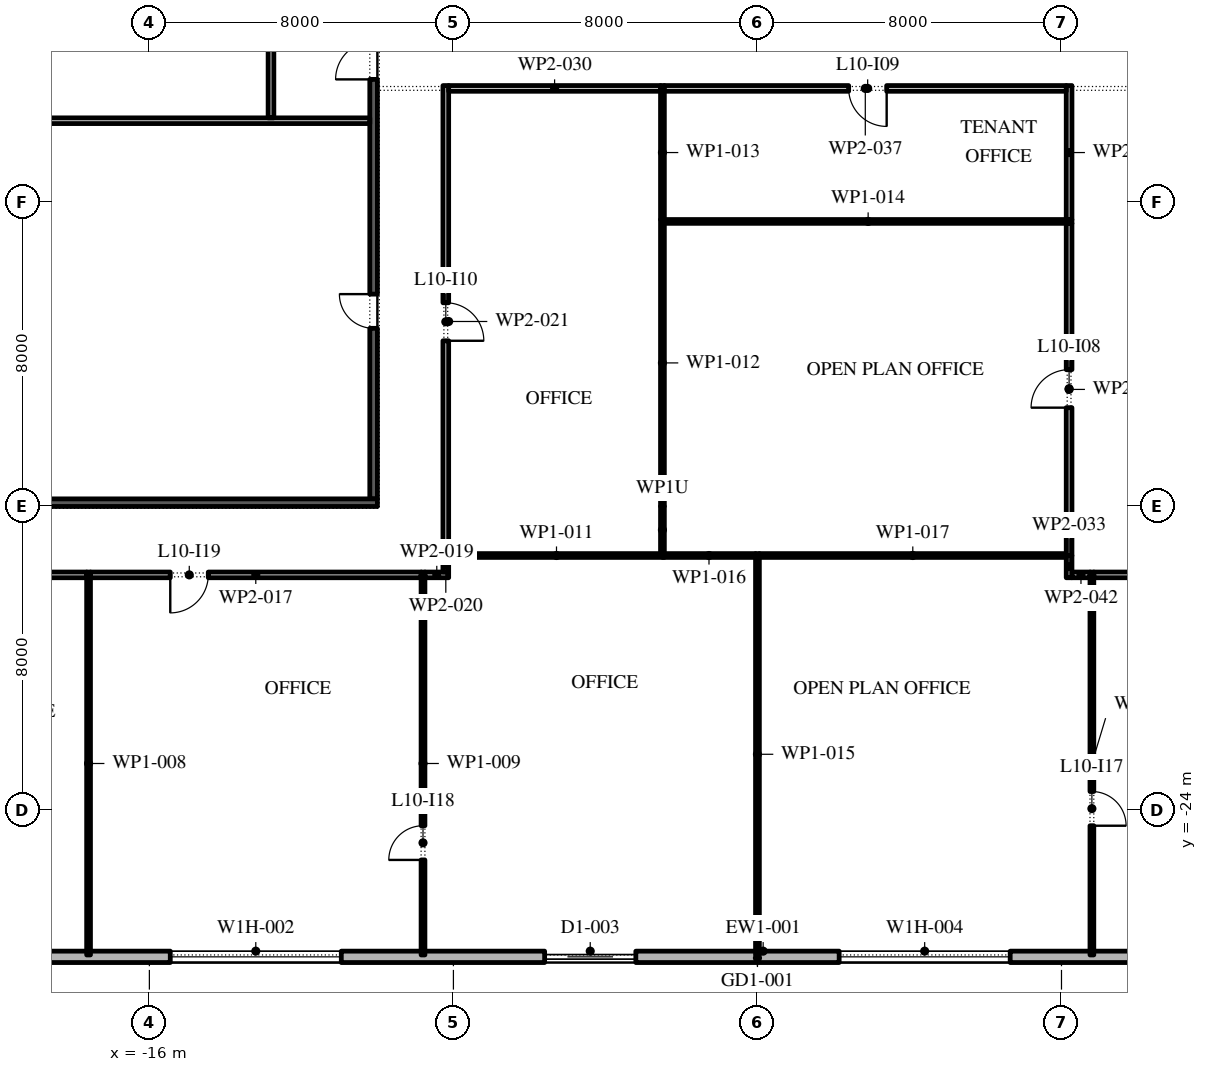
"""IFC4 building model, lengths in metres.
Left out: names, types, materials, properties, quantities, classifications, styles, units other than length and angle.
Written with IfcOpenShell. Run it as: python <this file> out.ifc"""

import sys

from ifc_helpers import new_model, si_unit, direction, frame, frame_2d, origin, place, context, subcontext, project, spatial, rectangle, extrude, element, fill, save


model = new_model("IFC4")
c1 = context("Model", 3, precision=1e-05, world=origin(), true_north=direction((0.0, 1.0)))
c2 = subcontext(c1, "Body", "Model", "MODEL_VIEW")
j1 = project(units=[si_unit("LENGTHUNIT", "METRE"), si_unit("PLANEANGLEUNIT", "RADIAN")], contexts=[c1])
p1 = place(None, origin())
s1 = spatial("IfcSite", under=j1, at=p1, CompositionType="ELEMENT")
p2 = place(p1, origin())
s2 = spatial("IfcBuilding", under=s1, at=p2, CompositionType="ELEMENT")
p3 = place(p2, frame((0.0, 0.0, 52.2)))
s3 = spatial("IfcBuildingStorey", under=s2, at=p3, CompositionType="ELEMENT", Elevation=52.2)
p4 = place(p3, frame((-26.1, -27.85, 0.0), z_axis=(0.0, 0.0, 1.0), x_axis=(1.0, 0.0, 0.0)))
e1 = element("IfcWall", 1, at=p4, inside=s3, PredefinedType="STANDARD", context=c2, shape_type="SweptSolid", body=[
    extrude(rectangle(XDim=52.5, YDim=0.3, at=frame_2d((26.25, 0.0))), origin(), (0.0, 0.0, 1.0), 4.0),
])
p5 = place(p4, frame((2.0, 0.0, 0.45)))
e2 = element("IfcOpeningElement", 2, at=p5, cuts=e1, PredefinedType="OPENING", context=c2, shape_type="SweptSolid", body=[
    extrude(rectangle(XDim=4.5, YDim=2.75, at=frame_2d((2.25, 1.375))), frame((0.0, 0.16, 0.0), z_axis=(0.0, -1.0, 0.0), x_axis=(1.0, 0.0, 0.0)), (0.0, 0.0, 1.0), 0.32),
])
p6 = place(p4, frame((10.65, 0.0, 0.45)))
e3 = element("IfcOpeningElement", 3, at=p6, cuts=e1, PredefinedType="OPENING", context=c2, shape_type="SweptSolid", body=[
    extrude(rectangle(XDim=4.5, YDim=2.75, at=frame_2d((2.25, 1.375))), frame((0.0, 0.16, 0.0), z_axis=(0.0, -1.0, 0.0), x_axis=(1.0, 0.0, 0.0)), (0.0, 0.0, 1.0), 0.32),
])
p7 = place(p4, frame((20.5, 0.0, 0.0)))
e4 = element("IfcOpeningElement", 4, at=p7, cuts=e1, PredefinedType="OPENING", context=c2, shape_type="SweptSolid", body=[
    extrude(rectangle(XDim=2.4, YDim=3.5, at=frame_2d((1.2, 1.75))), frame((0.0, 0.16, 0.0), z_axis=(0.0, -1.0, 0.0), x_axis=(1.0, 0.0, 0.0)), (0.0, 0.0, 1.0), 0.32),
])
p8 = place(p4, frame((28.25, 0.0, 0.45)))
e5 = element("IfcOpeningElement", 5, at=p8, cuts=e1, PredefinedType="OPENING", context=c2, shape_type="SweptSolid", body=[
    extrude(rectangle(XDim=4.5, YDim=2.75, at=frame_2d((2.25, 1.375))), frame((0.0, 0.16, 0.0), z_axis=(0.0, -1.0, 0.0), x_axis=(1.0, 0.0, 0.0)), (0.0, 0.0, 1.0), 0.32),
])
p9 = place(p4, frame((37.05, 0.0, 0.45)))
e6 = element("IfcOpeningElement", 6, at=p9, cuts=e1, PredefinedType="OPENING", context=c2, shape_type="SweptSolid", body=[
    extrude(rectangle(XDim=4.5, YDim=2.75, at=frame_2d((2.25, 1.375))), frame((0.0, 0.16, 0.0), z_axis=(0.0, -1.0, 0.0), x_axis=(1.0, 0.0, 0.0)), (0.0, 0.0, 1.0), 0.32),
])
p10 = place(p4, frame((45.85, 0.0, 0.45)))
e7 = element("IfcOpeningElement", 7, at=p10, cuts=e1, PredefinedType="OPENING", context=c2, shape_type="SweptSolid", body=[
    extrude(rectangle(XDim=4.5, YDim=2.75, at=frame_2d((2.25, 1.375))), frame((0.0, 0.16, 0.0), z_axis=(0.0, -1.0, 0.0), x_axis=(1.0, 0.0, 0.0)), (0.0, 0.0, 1.0), 0.32),
])
p11 = place(p3, frame((-10.1, -15.8, 0.0), z_axis=(0.0, 0.0, 1.0), x_axis=(0.0, 1.0, 0.0)))
e8 = element("IfcWall", 8, at=p11, inside=s3, PredefinedType="SHEAR", context=c2, shape_type="SweptSolid", body=[
    extrude(rectangle(XDim=13.05, YDim=0.2, at=frame_2d((6.525, 0.0))), origin(), (0.0, 0.0, 1.0), 4.0),
])
p12 = place(p11, frame((4.488, 0.0, 0.0)))
e9 = element("IfcOpeningElement", 9, at=p12, cuts=e8, PredefinedType="OPENING", context=c2, shape_type="SweptSolid", body=[
    extrude(rectangle(XDim=0.9, YDim=2.1, at=frame_2d((0.45, 1.05))), frame((0.0, 0.11, 0.0), z_axis=(0.0, -1.0, 0.0), x_axis=(1.0, 0.0, 0.0)), (0.0, 0.0, 1.0), 0.22),
])
p13 = place(p11, frame((11.038, 0.0, 0.0)))
e10 = element("IfcOpeningElement", 10, at=p13, cuts=e8, PredefinedType="OPENING", context=c2, shape_type="SweptSolid", body=[
    extrude(rectangle(XDim=1.0, YDim=2.1, at=frame_2d((0.5, 1.05))), frame((0.0, 0.11, 0.0), z_axis=(0.0, -1.0, 0.0), x_axis=(1.0, 0.0, 0.0)), (0.0, 0.0, 1.0), 0.22),
])
p14 = place(p3, frame((-22.0, -15.9, 0.0), z_axis=(0.0, 0.0, 1.0), x_axis=(1.0, 0.0, 0.0)))
e11 = element("IfcWall", 11, at=p14, inside=s3, PredefinedType="SHEAR", context=c2, shape_type="SweptSolid", body=[
    extrude(rectangle(XDim=12.0, YDim=0.2, at=frame_2d((6.0, 0.0))), origin(), (0.0, 0.0, 1.0), 4.0),
])
p15 = place(p3, frame((-21.8, -5.85, 0.0), z_axis=(0.0, 0.0, 1.0), x_axis=(1.0, 0.0, 0.0)))
e12 = element("IfcWall", 12, at=p15, inside=s3, PredefinedType="PARTITIONING", context=c2, shape_type="SweptSolid", body=[
    extrude(rectangle(XDim=11.6, YDim=0.15, at=frame_2d((5.8, 0.0))), origin(), (0.0, 0.0, 1.0), 4.0),
])
p16 = place(p3, frame((-12.8, -5.775, 0.0), z_axis=(0.0, 0.0, 1.0), x_axis=(0.0, 1.0, 0.0)))
e13 = element("IfcWall", 13, at=p16, inside=s3, PredefinedType="PARTITIONING", context=c2, shape_type="SweptSolid", body=[
    extrude(rectangle(XDim=3.025, YDim=0.15, at=frame_2d((1.512, 0.0))), origin(), (0.0, 0.0, 1.0), 4.0),
])
p17 = place(p3, frame((-17.6, -27.8, 0.0), z_axis=(0.0, 0.0, 1.0), x_axis=(0.0, 1.0, 0.0)))
e14 = element("IfcWall", 14, at=p17, inside=s3, PredefinedType="PARTITIONING", context=c2, shape_type="SweptSolid", body=[
    extrude(rectangle(XDim=10.075, YDim=0.1, at=frame_2d((5.038, 0.0))), origin(), (0.0, 0.0, 1.0), 4.0),
])
p18 = place(p3, frame((-17.65, -17.8, 0.0), z_axis=(0.0, 0.0, 1.0), x_axis=(-1.0, 0.0, 0.0)))
e15 = element("IfcWall", 15, at=p18, inside=s3, PredefinedType="PARTITIONING", context=c2, shape_type="SweptSolid", body=[
    extrude(rectangle(XDim=6.075, YDim=0.15, at=frame_2d((3.038, 0.0))), origin(), (0.0, 0.0, 1.0), 4.0),
])
p19 = place(p18, frame((2.5, 0.0, 0.0)))
e16 = element("IfcOpeningElement", 16, at=p19, cuts=e15, PredefinedType="OPENING", context=c2, shape_type="SweptSolid", body=[
    extrude(rectangle(XDim=1.0, YDim=2.1, at=frame_2d((0.5, 1.05))), frame((0.0, 0.085, 0.0), z_axis=(0.0, -1.0, 0.0), x_axis=(1.0, 0.0, 0.0)), (0.0, 0.0, 1.0), 0.17),
])
p20 = place(p3, frame((-8.8, -27.8, 0.0), z_axis=(0.0, 0.0, 1.0), x_axis=(0.0, 1.0, 0.0)))
e17 = element("IfcWall", 17, at=p20, inside=s3, PredefinedType="PARTITIONING", context=c2, shape_type="SweptSolid", body=[
    extrude(rectangle(XDim=10.075, YDim=0.1, at=frame_2d((5.038, 0.0))), origin(), (0.0, 0.0, 1.0), 4.0),
])
p21 = place(p20, frame((2.5, 0.0, 0.0)))
e18 = element("IfcOpeningElement", 18, at=p21, cuts=e17, PredefinedType="OPENING", context=c2, shape_type="SweptSolid", body=[
    extrude(rectangle(XDim=0.9, YDim=2.1, at=frame_2d((0.45, 1.05))), frame((0.0, 0.06, 0.0), z_axis=(0.0, -1.0, 0.0), x_axis=(1.0, 0.0, 0.0)), (0.0, 0.0, 1.0), 0.12),
])
p22 = place(p3, frame((-8.85, -17.8, 0.0), z_axis=(0.0, 0.0, 1.0), x_axis=(-1.0, 0.0, 0.0)))
e19 = element("IfcWall", 19, at=p22, inside=s3, PredefinedType="PARTITIONING", context=c2, shape_type="SweptSolid", body=[
    extrude(rectangle(XDim=8.7, YDim=0.15, at=frame_2d((4.35, 0.0))), origin(), (0.0, 0.0, 1.0), 4.0),
])
p23 = place(p22, frame((5.6, 0.0, 0.0)))
e20 = element("IfcOpeningElement", 20, at=p23, cuts=e19, PredefinedType="OPENING", context=c2, shape_type="SweptSolid", body=[
    extrude(rectangle(XDim=1.0, YDim=2.1, at=frame_2d((0.5, 1.05))), frame((0.0, 0.085, 0.0), z_axis=(0.0, -1.0, 0.0), x_axis=(1.0, 0.0, 0.0)), (0.0, 0.0, 1.0), 0.17),
])
p24 = place(p3, frame((-8.125, -17.8, 0.0), z_axis=(0.0, 0.0, 1.0), x_axis=(-1.0, 0.0, 0.0)))
e21 = element("IfcWall", 21, at=p24, inside=s3, PredefinedType="PARTITIONING", context=c2, shape_type="SweptSolid", body=[
    extrude(rectangle(XDim=0.625, YDim=0.15, at=frame_2d((0.312, 0.0))), origin(), (0.0, 0.0, 1.0), 4.0),
])
p25 = place(p3, frame((-8.2, -17.34, 0.0), z_axis=(0.0, 0.0, 1.0), x_axis=(0.0, -1.0, 0.0)))
e22 = element("IfcWall", 22, at=p25, inside=s3, PredefinedType="PARTITIONING", context=c2, shape_type="SweptSolid", body=[
    extrude(rectangle(XDim=0.385, YDim=0.15, at=frame_2d((0.192, 0.0))), origin(), (0.0, 0.0, 1.0), 4.0),
])
p26 = place(p3, frame((-8.2, -4.925, 0.0), z_axis=(0.0, 0.0, 1.0), x_axis=(0.0, -1.0, 0.0)))
e23 = element("IfcWall", 23, at=p26, inside=s3, PredefinedType="PARTITIONING", context=c2, shape_type="SweptSolid", body=[
    extrude(rectangle(XDim=12.415, YDim=0.15, at=frame_2d((6.208, 0.0))), origin(), (0.0, 0.0, 1.0), 4.0),
])
p27 = place(p26, frame((5.715, 0.0, 0.0)))
e24 = element("IfcOpeningElement", 24, at=p27, cuts=e23, PredefinedType="OPENING", context=c2, shape_type="SweptSolid", body=[
    extrude(rectangle(XDim=1.0, YDim=2.1, at=frame_2d((0.5, 1.05))), frame((0.0, 0.085, 0.0), z_axis=(0.0, -1.0, 0.0), x_axis=(1.0, 0.0, 0.0)), (0.0, 0.0, 1.0), 0.17),
])
p28 = place(p3, frame((-2.45, -17.29, 0.0), z_axis=(0.0, 0.0, 1.0), x_axis=(-1.0, 0.0, 0.0)))
e25 = element("IfcWall", 25, at=p28, inside=s3, PredefinedType="PARTITIONING", context=c2, shape_type="SweptSolid", body=[
    extrude(rectangle(XDim=5.675, YDim=0.1, at=frame_2d((2.837, 0.0))), origin(), (0.0, 0.0, 1.0), 4.0),
])
p29 = place(p3, frame((-2.5, -17.24, 0.0), z_axis=(0.0, 0.0, 1.0), x_axis=(0.0, 1.0, 0.0)))
e26 = element("IfcWall", 26, at=p29, inside=s3, PredefinedType="PARTITIONING", context=c2, shape_type="SweptSolid", body=[
    extrude(rectangle(XDim=1.245, YDim=0.1, at=frame_2d((0.623, 0.0))), origin(), (0.0, 0.0, 1.0), 3.322),
])
p30 = place(p3, frame((-2.5, -8.45, 0.0), z_axis=(0.0, 0.0, 1.0), x_axis=(0.0, 1.0, 0.0)))
e27 = element("IfcWall", 27, at=p30, inside=s3, PredefinedType="PARTITIONING", context=c2, shape_type="SweptSolid", body=[
    extrude(rectangle(XDim=3.525, YDim=0.1, at=frame_2d((1.762, 0.0))), origin(), (0.0, 0.0, 1.0), 4.0),
])
p31 = place(p3, frame((-2.45, -8.5, 0.0), z_axis=(0.0, 0.0, 1.0), x_axis=(1.0, 0.0, 0.0)))
e28 = element("IfcWall", 28, at=p31, inside=s3, PredefinedType="PARTITIONING", context=c2, shape_type="SweptSolid", body=[
    extrude(rectangle(XDim=10.725, YDim=0.1, at=frame_2d((5.362, 0.0))), origin(), (0.0, 0.0, 1.0), 4.0),
])
p32 = place(p3, frame((-2.55, -5.0, 0.0), z_axis=(0.0, 0.0, 1.0), x_axis=(-1.0, 0.0, 0.0)))
e29 = element("IfcWall", 29, at=p32, inside=s3, PredefinedType="PARTITIONING", context=c2, shape_type="SweptSolid", body=[
    extrude(rectangle(XDim=5.575, YDim=0.15, at=frame_2d((2.788, 0.0))), origin(), (0.0, 0.0, 1.0), 4.0),
])
p33 = place(p3, frame((0.0, -27.8, 0.0), z_axis=(0.0, 0.0, 1.0), x_axis=(0.0, 1.0, 0.0)))
e30 = element("IfcWall", 30, at=p33, inside=s3, PredefinedType="PARTITIONING", context=c2, shape_type="SweptSolid", body=[
    extrude(rectangle(XDim=10.56, YDim=0.1, at=frame_2d((5.28, 0.0))), origin(), (0.0, 0.0, 1.0), 4.0),
])
p34 = place(p3, frame((-0.05, -17.29, 0.0), z_axis=(0.0, 0.0, 1.0), x_axis=(-1.0, 0.0, 0.0)))
e31 = element("IfcWall", 31, at=p34, inside=s3, PredefinedType="PARTITIONING", context=c2, shape_type="SweptSolid", body=[
    extrude(rectangle(XDim=2.45, YDim=0.1, at=frame_2d((1.225, 0.0))), origin(), (0.0, 0.0, 1.0), 4.0),
])
p35 = place(p3, frame((8.2, -17.875, 0.0), z_axis=(0.0, 0.0, 1.0), x_axis=(0.0, 1.0, 0.0)))
e32 = element("IfcWall", 32, at=p35, inside=s3, PredefinedType="PARTITIONING", context=c2, shape_type="SweptSolid", body=[
    extrude(rectangle(XDim=0.585, YDim=0.15, at=frame_2d((0.292, 0.0))), origin(), (0.0, 0.0, 1.0), 4.0),
])
p36 = place(p3, frame((8.125, -17.29, 0.0), z_axis=(0.0, 0.0, 1.0), x_axis=(-1.0, 0.0, 0.0)))
e33 = element("IfcWall", 33, at=p36, inside=s3, PredefinedType="PARTITIONING", context=c2, shape_type="SweptSolid", body=[
    extrude(rectangle(XDim=8.075, YDim=0.1, at=frame_2d((4.038, 0.0))), origin(), (0.0, 0.0, 1.0), 4.0),
])
p37 = place(p3, frame((8.2, -17.29, 0.0), z_axis=(0.0, 0.0, 1.0), x_axis=(0.0, 1.0, 0.0)))
e34 = element("IfcWall", 34, at=p37, inside=s3, PredefinedType="PARTITIONING", context=c2, shape_type="SweptSolid", body=[
    extrude(rectangle(XDim=8.74, YDim=0.15, at=frame_2d((4.37, 0.0))), origin(), (0.0, 0.0, 1.0), 4.0),
])
p38 = place(p37, frame((3.89, 0.0, 0.0)))
e35 = element("IfcOpeningElement", 35, at=p38, cuts=e34, PredefinedType="OPENING", context=c2, shape_type="SweptSolid", body=[
    extrude(rectangle(XDim=1.0, YDim=2.1, at=frame_2d((0.5, 1.05))), frame((0.0, 0.085, 0.0), z_axis=(0.0, -1.0, 0.0), x_axis=(1.0, 0.0, 0.0)), (0.0, 0.0, 1.0), 0.17),
])
p39 = place(p3, frame((8.2, -8.45, 0.0), z_axis=(0.0, 0.0, 1.0), x_axis=(0.0, 1.0, 0.0)))
e36 = element("IfcWall", 36, at=p39, inside=s3, PredefinedType="PARTITIONING", context=c2, shape_type="SweptSolid", body=[
    extrude(rectangle(XDim=3.525, YDim=0.15, at=frame_2d((1.762, 0.0))), origin(), (0.0, 0.0, 1.0), 4.0),
])
p40 = place(p3, frame((8.125, -5.0, 0.0), z_axis=(0.0, 0.0, 1.0), x_axis=(-1.0, 0.0, 0.0)))
e37 = element("IfcWall", 37, at=p40, inside=s3, PredefinedType="PARTITIONING", context=c2, shape_type="SweptSolid", body=[
    extrude(rectangle(XDim=10.575, YDim=0.15, at=frame_2d((5.288, 0.0))), origin(), (0.0, 0.0, 1.0), 4.0),
])
p41 = place(p40, frame((4.725, 0.0, 0.0)))
e38 = element("IfcOpeningElement", 38, at=p41, cuts=e37, PredefinedType="OPENING", context=c2, shape_type="SweptSolid", body=[
    extrude(rectangle(XDim=1.0, YDim=2.1, at=frame_2d((0.5, 1.05))), frame((0.0, 0.085, 0.0), z_axis=(0.0, -1.0, 0.0), x_axis=(1.0, 0.0, 0.0)), (0.0, 0.0, 1.0), 0.17),
])
p42 = place(p3, frame((8.8, -27.8, 0.0), z_axis=(0.0, 0.0, 1.0), x_axis=(0.0, 1.0, 0.0)))
e39 = element("IfcWall", 39, at=p42, inside=s3, PredefinedType="PARTITIONING", context=c2, shape_type="SweptSolid", body=[
    extrude(rectangle(XDim=10.075, YDim=0.1, at=frame_2d((5.038, 0.0))), origin(), (0.0, 0.0, 1.0), 4.0),
])
p43 = place(p42, frame((3.4, 0.0, 0.0)))
e40 = element("IfcOpeningElement", 40, at=p43, cuts=e39, PredefinedType="OPENING", context=c2, shape_type="SweptSolid", body=[
    extrude(rectangle(XDim=0.9, YDim=2.1, at=frame_2d((0.45, 1.05))), frame((0.0, 0.06, 0.0), z_axis=(0.0, -1.0, 0.0), x_axis=(1.0, 0.0, 0.0)), (0.0, 0.0, 1.0), 0.12),
])
p44 = place(p3, frame((8.75, -17.8, 0.0), z_axis=(0.0, 0.0, 1.0), x_axis=(-1.0, 0.0, 0.0)))
e41 = element("IfcWall", 41, at=p44, inside=s3, PredefinedType="PARTITIONING", context=c2, shape_type="SweptSolid", body=[
    extrude(rectangle(XDim=0.475, YDim=0.15, at=frame_2d((0.238, 0.0))), origin(), (0.0, 0.0, 1.0), 4.0),
])
p45 = place(p3, frame((17.55, -17.8, 0.0), z_axis=(0.0, 0.0, 1.0), x_axis=(-1.0, 0.0, 0.0)))
e42 = element("IfcWall", 42, at=p45, inside=s3, PredefinedType="PARTITIONING", context=c2, shape_type="SweptSolid", body=[
    extrude(rectangle(XDim=8.7, YDim=0.15, at=frame_2d((4.35, 0.0))), origin(), (0.0, 0.0, 1.0), 4.0),
])
p46 = place(p45, frame((4.85, 0.0, 0.0)))
e43 = element("IfcOpeningElement", 43, at=p46, cuts=e42, PredefinedType="OPENING", context=c2, shape_type="SweptSolid", body=[
    extrude(rectangle(XDim=1.0, YDim=2.1, at=frame_2d((0.5, 1.05))), frame((0.0, 0.085, 0.0), z_axis=(0.0, -1.0, 0.0), x_axis=(1.0, 0.0, 0.0)), (0.0, 0.0, 1.0), 0.17),
])
p47 = place(p3, frame((-2.5, -15.995, 0.0), z_axis=(0.0, 0.0, 1.0), x_axis=(0.0, 1.0, 0.0)))
e44 = element("IfcWall", 44, at=p47, inside=s3, PredefinedType="PARTITIONING", context=c2, shape_type="SweptSolid", body=[
    extrude(rectangle(XDim=7.545, YDim=0.1, at=frame_2d((3.772, 0.0))), origin(), (0.0, 0.0, 1.0), 4.0),
])
p48 = place(p6, origin())
e45 = element("IfcWindow", 45, at=p48, inside=s3, PartitioningType="DOUBLE_PANEL_VERTICAL", PredefinedType="WINDOW", context=c2, shape_type="SweptSolid", body=[
    extrude(rectangle(XDim=4.5, YDim=2.75, at=frame_2d((2.25, 1.375))), frame((0.0, 0.03, 0.0), z_axis=(0.0, -1.0, 0.0), x_axis=(1.0, 0.0, 0.0)), (0.0, 0.0, 1.0), 0.06),
])
fill(e3, e45)
p49 = place(p7, origin())
e46 = element("IfcDoor", 46, at=p49, inside=s3, OperationType="DOUBLE_DOOR_SLIDING", PredefinedType="DOOR", context=c2, shape_type="SweptSolid", body=[
    extrude(rectangle(XDim=2.4, YDim=3.5, at=frame_2d((1.2, 1.75))), frame((0.0, 0.025, 0.0), z_axis=(0.0, -1.0, 0.0), x_axis=(1.0, 0.0, 0.0)), (0.0, 0.0, 1.0), 0.05),
])
fill(e4, e46)
p50 = place(p8, origin())
e47 = element("IfcWindow", 47, at=p50, inside=s3, PartitioningType="DOUBLE_PANEL_VERTICAL", PredefinedType="WINDOW", context=c2, shape_type="SweptSolid", body=[
    extrude(rectangle(XDim=4.5, YDim=2.75, at=frame_2d((2.25, 1.375))), frame((0.0, 0.03, 0.0), z_axis=(0.0, -1.0, 0.0), x_axis=(1.0, 0.0, 0.0)), (0.0, 0.0, 1.0), 0.06),
])
fill(e5, e47)
p51 = place(p12, origin())
e48 = element("IfcDoor", 48, at=p51, inside=s3, OperationType="SINGLE_SWING_LEFT", PredefinedType="DOOR", context=c2, shape_type="SweptSolid", body=[
    extrude(rectangle(XDim=0.9, YDim=2.1, at=frame_2d((0.45, 1.05))), frame((0.0, 0.1, 0.0), z_axis=(0.0, -1.0, 0.0), x_axis=(1.0, 0.0, 0.0)), (0.0, 0.0, 1.0), 0.05),
])
fill(e9, e48)
p52 = place(p13, origin())
e49 = element("IfcDoor", 49, at=p52, inside=s3, OperationType="SINGLE_SWING_RIGHT", PredefinedType="DOOR", context=c2, shape_type="SweptSolid", body=[
    extrude(rectangle(XDim=1.0, YDim=2.1, at=frame_2d((0.5, 1.05))), frame((0.0, 0.1, 0.0), z_axis=(0.0, -1.0, 0.0), x_axis=(1.0, 0.0, 0.0)), (0.0, 0.0, 1.0), 0.05),
])
fill(e10, e49)
p53 = place(p38, origin())
e50 = element("IfcDoor", 50, at=p53, inside=s3, OperationType="SINGLE_SWING_RIGHT", PredefinedType="DOOR", context=c2, shape_type="SweptSolid", body=[
    extrude(rectangle(XDim=1.0, YDim=2.1, at=frame_2d((0.5, 1.05))), frame((0.0, 0.025, 0.0), z_axis=(0.0, -1.0, 0.0), x_axis=(1.0, 0.0, 0.0)), (0.0, 0.0, 1.0), 0.05),
])
fill(e35, e50)
p54 = place(p41, origin())
e51 = element("IfcDoor", 51, at=p54, inside=s3, OperationType="SINGLE_SWING_RIGHT", PredefinedType="DOOR", context=c2, shape_type="SweptSolid", body=[
    extrude(rectangle(XDim=1.0, YDim=2.1, at=frame_2d((0.5, 1.05))), frame((0.0, 0.025, 0.0), z_axis=(0.0, -1.0, 0.0), x_axis=(1.0, 0.0, 0.0)), (0.0, 0.0, 1.0), 0.05),
])
fill(e38, e51)
p55 = place(p27, origin())
e52 = element("IfcDoor", 52, at=p55, inside=s3, OperationType="SINGLE_SWING_LEFT", PredefinedType="DOOR", context=c2, shape_type="SweptSolid", body=[
    extrude(rectangle(XDim=1.0, YDim=2.1, at=frame_2d((0.5, 1.05))), frame((0.0, 0.025, 0.0), z_axis=(0.0, -1.0, 0.0), x_axis=(1.0, 0.0, 0.0)), (0.0, 0.0, 1.0), 0.05),
])
fill(e24, e52)
p56 = place(p43, frame((0.9, 0.0, 0.0), z_axis=(0.0, 0.0, 1.0), x_axis=(-1.0, 0.0, 0.0)))
e53 = element("IfcDoor", 53, at=p56, inside=s3, OperationType="SINGLE_SWING_LEFT", PredefinedType="DOOR", context=c2, shape_type="SweptSolid", body=[
    extrude(rectangle(XDim=0.9, YDim=2.1, at=frame_2d((0.45, 1.05))), frame((0.0, 0.025, 0.0), z_axis=(0.0, -1.0, 0.0), x_axis=(1.0, 0.0, 0.0)), (0.0, 0.0, 1.0), 0.05),
])
fill(e40, e53)
p57 = place(p21, origin())
e54 = element("IfcDoor", 54, at=p57, inside=s3, OperationType="SINGLE_SWING_RIGHT", PredefinedType="DOOR", context=c2, shape_type="SweptSolid", body=[
    extrude(rectangle(XDim=0.9, YDim=2.1, at=frame_2d((0.45, 1.05))), frame((0.0, 0.025, 0.0), z_axis=(0.0, -1.0, 0.0), x_axis=(1.0, 0.0, 0.0)), (0.0, 0.0, 1.0), 0.05),
])
fill(e18, e54)
p58 = place(p23, origin())
e55 = element("IfcDoor", 55, at=p58, inside=s3, OperationType="SINGLE_SWING_LEFT", PredefinedType="DOOR", context=c2, shape_type="SweptSolid", body=[
    extrude(rectangle(XDim=1.0, YDim=2.1, at=frame_2d((0.5, 1.05))), frame((0.0, 0.025, 0.0), z_axis=(0.0, -1.0, 0.0), x_axis=(1.0, 0.0, 0.0)), (0.0, 0.0, 1.0), 0.05),
])
fill(e20, e55)
save(model, sys.argv[1])
